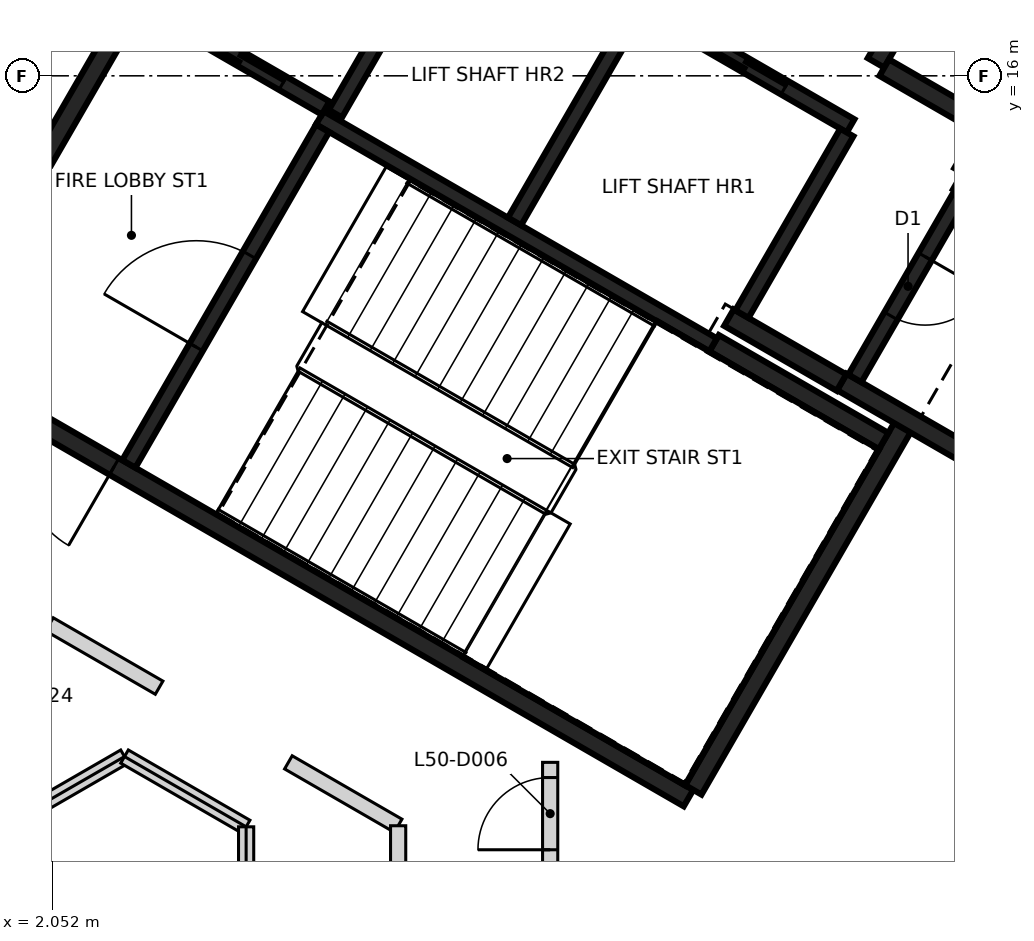
"""IFC4 building model, lengths in metres.
Left out: names, types, materials, properties, quantities, classifications, styles, units other than length and angle.
Written with IfcOpenShell. Run it as: python <this file> out.ifc"""

import sys

from ifc_helpers import new_model, si_unit, direction, frame, frame_2d, origin, place, context, subcontext, project, spatial, rectangle, extrude, element, fill, save


model = new_model("IFC4")
c1 = context("Model", 3, precision=1e-05, world=origin(), true_north=direction((0.0, 1.0)))
c2 = subcontext(c1, "Body", "Model", "MODEL_VIEW")
j1 = project(units=[si_unit("LENGTHUNIT", "METRE"), si_unit("PLANEANGLEUNIT", "RADIAN")], contexts=[c1])
p1 = place(None, origin())
s1 = spatial("IfcSite", under=j1, at=p1, CompositionType="ELEMENT")
p2 = place(p1, origin())
s2 = spatial("IfcBuilding", under=s1, at=p2, CompositionType="ELEMENT")
p3 = place(p2, frame((0.0, 0.0, 200.8)))
s3 = spatial("IfcBuildingStorey", under=s2, at=p3, CompositionType="ELEMENT", Elevation=200.8)
p4 = place(p3, frame((10.42, 6.498, 0.0), z_axis=(0.0, 0.0, 1.0), x_axis=(-0.866021906294, 0.500006057782, 0.0)))
e1 = element("IfcWall", 1, at=p4, inside=s3, PredefinedType="SHEAR", context=c2, shape_type="SweptSolid", body=[
    extrude(rectangle(XDim=11.55, YDim=0.25, at=frame_2d((5.775, 0.0))), origin(), (0.0, 0.0, 1.0), 3.25),
])
p5 = place(p4, frame((10.025, 0.0, 0.0)))
e2 = element("IfcOpeningElement", 2, at=p5, cuts=e1, PredefinedType="OPENING", context=c2, shape_type="SweptSolid", body=[
    extrude(rectangle(XDim=1.2, YDim=2.1, at=frame_2d((0.6, 1.05))), frame((0.0, 0.135, 0.0), z_axis=(0.0, -1.0, 0.0), x_axis=(1.0, 0.0, 0.0)), (0.0, 0.0, 1.0), 0.27),
])
p6 = place(p4, frame((8.725, 0.0, 0.0)))
e3 = element("IfcOpeningElement", 3, at=p6, cuts=e1, PredefinedType="OPENING", context=c2, shape_type="SweptSolid", body=[
    extrude(rectangle(XDim=1.2, YDim=2.1, at=frame_2d((0.6, 1.05))), frame((0.0, 0.135, 0.0), z_axis=(0.0, -1.0, 0.0), x_axis=(1.0, 0.0, 0.0)), (0.0, 0.0, 1.0), 0.27),
])
p7 = place(p3, frame((0.48, 12.381, 0.0), z_axis=(0.0, 0.0, 1.0), x_axis=(0.49999885962, 0.866026062182, 0.0)))
e4 = element("IfcWall", 4, at=p7, inside=s3, PredefinedType="SHEAR", context=c2, shape_type="SweptSolid", body=[
    extrude(rectangle(XDim=5.225, YDim=0.25, at=frame_2d((2.612, 0.0))), origin(), (0.0, 0.0, 1.0), 3.25),
])
p8 = place(p3, frame((13.238, 11.378, 0.0), z_axis=(0.0, 0.0, 1.0), x_axis=(-0.500008851346, -0.866020293397, 0.0)))
e5 = element("IfcWall", 5, at=p8, inside=s3, PredefinedType="SHEAR", context=c2, shape_type="SweptSolid", body=[
    extrude(rectangle(XDim=5.51, YDim=0.25, at=frame_2d((2.755, 0.0))), origin(), (0.0, 0.0, 1.0), 3.25),
])
p9 = place(p3, frame((14.918, 10.54, 0.0), z_axis=(0.0, 0.0, 1.0), x_axis=(-0.866063538972, 0.499933942099, 0.0)))
e6 = element("IfcWall", 6, at=p9, inside=s3, PredefinedType="SHEAR", context=c2, shape_type="SweptSolid", body=[
    extrude(rectangle(XDim=2.865, YDim=0.25, at=frame_2d((1.432, 0.0))), origin(), (0.0, 0.0, 1.0), 3.25),
])
p10 = place(p3, frame((13.963, 14.614, 0.0), z_axis=(0.0, 0.0, 1.0), x_axis=(0.866042235819, -0.499970844928, 0.0)))
e7 = element("IfcWall", 7, at=p10, inside=s3, PredefinedType="SHEAR", context=c2, shape_type="SweptSolid", body=[
    extrude(rectangle(XDim=2.865, YDim=0.25, at=frame_2d((1.432, 0.0))), origin(), (0.0, 0.0, 1.0), 3.25),
])
p11 = place(p3, frame((10.757, 12.481, 0.0), z_axis=(0.0, 0.0, 1.0), x_axis=(0.866022940537, -0.500004266446, 0.0)))
e8 = element("IfcWall", 8, at=p11, inside=s3, PredefinedType="SHEAR", context=c2, shape_type="SweptSolid", body=[
    extrude(rectangle(XDim=2.575, YDim=0.25, at=frame_2d((1.287, 0.0))), origin(), (0.0, 0.0, 1.0), 3.25),
])
p12 = place(p3, frame((13.819, 17.785, 0.0), z_axis=(0.0, 0.0, 1.0), x_axis=(-0.500039802285, -0.866002422705, 0.0)))
e9 = element("IfcWall", 9, at=p12, inside=s3, PredefinedType="SHEAR", context=c2, shape_type="SweptSolid", body=[
    extrude(rectangle(XDim=1.865, YDim=0.25, at=frame_2d((0.932, 0.0))), origin(), (0.0, 0.0, 1.0), 3.25),
])
p13 = place(p3, frame((12.433, 11.964, 0.0), z_axis=(0.0, 0.0, 1.0), x_axis=(-0.866038183914, 0.499977863513, 0.0)))
e10 = element("IfcWall", 10, at=p13, inside=s3, PredefinedType="SHEAR", context=c2, shape_type="SweptSolid", body=[
    extrude(rectangle(XDim=1.71, YDim=0.25, at=frame_2d((0.855, 0.0))), origin(), (0.0, 0.0, 1.0), 3.25),
])
p14 = place(p3, frame((12.995, 16.108, 0.0), z_axis=(0.0, 0.0, 1.0), x_axis=(0.866044474677, -0.49996696679, 0.0)))
e11 = element("IfcWall", 11, at=p14, inside=s3, PredefinedType="SHEAR", context=c2, shape_type="SweptSolid", body=[
    extrude(rectangle(XDim=1.584, YDim=0.25, at=frame_2d((0.792, 0.0))), origin(), (0.0, 0.0, 1.0), 3.25),
])
p15 = place(p3, frame((14.305, 15.207, 0.0), z_axis=(0.0, 0.0, 1.0), x_axis=(-0.499848422343, -0.866112899501, 0.0)))
e12 = element("IfcWall", 12, at=p15, inside=s3, PredefinedType="SHEAR", context=c2, shape_type="SweptSolid", body=[
    extrude(rectangle(XDim=0.559, YDim=0.25, at=frame_2d((0.28, 0.0))), origin(), (0.0, 0.0, 1.0), 3.25),
])
p16 = place(p3, frame((12.552, 15.342, 0.0), z_axis=(0.0, 0.0, 1.0), x_axis=(-0.866030299012, 0.499991521122, 0.0)))
e13 = element("IfcWall", 13, at=p16, inside=s3, PredefinedType="SHEAR", context=c2, shape_type="SweptSolid", body=[
    extrude(rectangle(XDim=6.1, YDim=0.2, at=frame_2d((3.05, 0.0))), origin(), (0.0, 0.0, 1.0), 3.25),
])
p17 = place(p16, frame((1.0, 0.0, 0.0)))
e14 = element("IfcOpeningElement", 14, at=p17, cuts=e13, PredefinedType="OPENING", context=c2, shape_type="SweptSolid", body=[
    extrude(rectangle(XDim=1.2, YDim=2.1, at=frame_2d((0.6, 1.05))), frame((0.0, 0.11, 0.0), z_axis=(0.0, -1.0, 0.0), x_axis=(1.0, 0.0, 0.0)), (0.0, 0.0, 1.0), 0.22),
])
p18 = place(p16, frame((3.982, 0.0, 0.0)))
e15 = element("IfcOpeningElement", 15, at=p18, cuts=e13, PredefinedType="OPENING", context=c2, shape_type="SweptSolid", body=[
    extrude(rectangle(XDim=1.2, YDim=2.1, at=frame_2d((0.6, 1.05))), frame((0.0, 0.11, 0.0), z_axis=(0.0, -1.0, 0.0), x_axis=(1.0, 0.0, 0.0)), (0.0, 0.0, 1.0), 0.22),
])
p19 = place(p3, frame((10.743, 12.46, 0.0), z_axis=(0.0, 0.0, 1.0), x_axis=(-0.866018848283, 0.500011354289, 0.0)))
e16 = element("IfcWall", 16, at=p19, inside=s3, PredefinedType="SHEAR", context=c2, shape_type="SweptSolid", body=[
    extrude(rectangle(XDim=5.974, YDim=0.2, at=frame_2d((2.987, 0.0))), origin(), (0.0, 0.0, 1.0), 3.25),
])
p20 = place(p3, frame((3.057, 10.895, 0.0), z_axis=(0.0, 0.0, 1.0), x_axis=(0.500027839223, 0.866009330205, 0.0)))
e17 = element("IfcWall", 17, at=p20, inside=s3, PredefinedType="SHEAR", context=c2, shape_type="SweptSolid", body=[
    extrude(rectangle(XDim=5.098, YDim=0.2, at=frame_2d((2.549, 0.0))), origin(), (0.0, 0.0, 1.0), 3.25),
])
p21 = place(p20, frame((1.774, 0.0, 0.0)))
e18 = element("IfcOpeningElement", 18, at=p21, cuts=e17, PredefinedType="OPENING", context=c2, shape_type="SweptSolid", body=[
    extrude(rectangle(XDim=1.4, YDim=2.1, at=frame_2d((0.7, 1.05))), frame((0.0, 0.11, 0.0), z_axis=(0.0, -1.0, 0.0), x_axis=(1.0, 0.0, 0.0)), (0.0, 0.0, 1.0), 0.22),
])
p22 = place(p3, frame((8.132, 14.084, 0.0), z_axis=(0.0, 0.0, 1.0), x_axis=(0.500030834389, 0.86600760081, 0.0)))
e19 = element("IfcWall", 19, at=p22, inside=s3, PredefinedType="SHEAR", context=c2, shape_type="SweptSolid", body=[
    extrude(rectangle(XDim=3.198, YDim=0.2, at=frame_2d((1.599, 0.0))), origin(), (0.0, 0.0, 1.0), 3.25),
])
p23 = place(p3, frame((14.008, 14.442, 0.0), z_axis=(0.0, 0.0, 1.0), x_axis=(-0.499986818241, -0.866033014143, 0.0)))
e20 = element("IfcWall", 20, at=p23, inside=s3, PredefinedType="SHEAR", context=c2, shape_type="SweptSolid", body=[
    extrude(rectangle(XDim=2.798, YDim=0.2, at=frame_2d((1.399, 0.0))), origin(), (0.0, 0.0, 1.0), 3.25),
])
p24 = place(p23, frame((0.949, 0.0, 0.0)))
e21 = element("IfcOpeningElement", 21, at=p24, cuts=e20, PredefinedType="OPENING", context=c2, shape_type="SweptSolid", body=[
    extrude(rectangle(XDim=0.9, YDim=2.1, at=frame_2d((0.45, 1.05))), frame((0.0, 0.11, 0.0), z_axis=(0.0, -1.0, 0.0), x_axis=(1.0, 0.0, 0.0)), (0.0, 0.0, 1.0), 0.22),
])
p25 = place(p3, frame((12.502, 15.255, 0.0), z_axis=(0.0, 0.0, 1.0), x_axis=(-0.499965018551, -0.866045599391, 0.0)))
e22 = element("IfcWall", 22, at=p25, inside=s3, PredefinedType="SHEAR", context=c2, shape_type="SweptSolid", body=[
    extrude(rectangle(XDim=2.759, YDim=0.2, at=frame_2d((1.379, 0.0))), origin(), (0.0, 0.0, 1.0), 3.25),
])
p26 = place(p3, frame((7.324, 18.187, 0.0), z_axis=(0.0, 0.0, 1.0), x_axis=(-0.499967891604, -0.866043940782, 0.0)))
e23 = element("IfcWall", 23, at=p26, inside=s3, PredefinedType="SHEAR", context=c2, shape_type="SweptSolid", body=[
    extrude(rectangle(XDim=3.1, YDim=0.2, at=frame_2d((1.55, 0.0))), origin(), (0.0, 0.0, 1.0), 3.25),
])
p27 = place(p3, frame((5.646, 15.576, 0.0), z_axis=(0.0, 0.0, 1.0), x_axis=(-0.866018407898, 0.500012117035, 0.0)))
e24 = element("IfcWall", 24, at=p27, inside=s3, PredefinedType="SHEAR", context=c2, shape_type="SweptSolid", body=[
    extrude(rectangle(XDim=2.651, YDim=0.2, at=frame_2d((1.325, 0.0))), origin(), (0.0, 0.0, 1.0), 3.25),
])
p28 = place(p27, frame((0.652, 0.0, 0.0)))
e25 = element("IfcOpeningElement", 25, at=p28, cuts=e24, PredefinedType="OPENING", context=c2, shape_type="SweptSolid", body=[
    extrude(rectangle(XDim=1.3, YDim=2.1, at=frame_2d((0.65, 1.05))), frame((0.0, 0.11, 0.0), z_axis=(0.0, -1.0, 0.0), x_axis=(1.0, 0.0, 0.0)), (0.0, 0.0, 1.0), 0.22),
])
p29 = place(p3, frame((-8.611, 2.648, 0.0), z_axis=(0.0, 0.0, 1.0), x_axis=(0.865953566425, 0.500124405319, 0.0)))
e26 = element("IfcWall", 26, at=p29, inside=s3, PredefinedType="PARTITIONING", context=c2, shape_type="SweptSolid", body=[
    extrude(rectangle(XDim=12.267, YDim=0.2, at=frame_2d((6.134, 0.0))), origin(), (0.0, 0.0, 1.0), 3.25),
])
p30 = place(p29, frame((9.904, 0.0, 0.0)))
e27 = element("IfcOpeningElement", 27, at=p30, cuts=e26, PredefinedType="OPENING", context=c2, shape_type="SweptSolid", body=[
    extrude(rectangle(XDim=0.9, YDim=2.1, at=frame_2d((0.45, 1.05))), frame((0.0, 0.11, 0.0), z_axis=(0.0, -1.0, 0.0), x_axis=(1.0, 0.0, 0.0)), (0.0, 0.0, 1.0), 0.22),
])
p31 = place(p29, frame((5.683, 0.0, 0.0)))
e28 = element("IfcOpeningElement", 28, at=p31, cuts=e26, PredefinedType="OPENING", context=c2, shape_type="SweptSolid", body=[
    extrude(rectangle(XDim=0.9, YDim=2.1, at=frame_2d((0.45, 1.05))), frame((0.0, 0.11, 0.0), z_axis=(0.0, -1.0, 0.0), x_axis=(1.0, 0.0, 0.0)), (0.0, 0.0, 1.0), 0.22),
])
p32 = place(p29, frame((1.463, 0.0, 0.0)))
e29 = element("IfcOpeningElement", 29, at=p32, cuts=e26, PredefinedType="OPENING", context=c2, shape_type="SweptSolid", body=[
    extrude(rectangle(XDim=0.9, YDim=2.1, at=frame_2d((0.45, 1.05))), frame((0.0, 0.11, 0.0), z_axis=(0.0, -1.0, 0.0), x_axis=(1.0, 0.0, 0.0)), (0.0, 0.0, 1.0), 0.22),
])
p33 = place(p3, frame((-1.086, 12.65, 0.0), z_axis=(0.0, 0.0, 1.0), x_axis=(0.492507119433, 0.870308415051, 0.0)))
e30 = element("IfcWall", 30, at=p33, inside=s3, PredefinedType="PARTITIONING", context=c2, shape_type="SweptSolid", body=[
    extrude(rectangle(XDim=10.531, YDim=0.2, at=frame_2d((5.266, 0.0))), origin(), (0.0, 0.0, 1.0), 3.25),
])
p34 = place(p33, frame((8.411, 0.0, 0.0)))
e31 = element("IfcOpeningElement", 31, at=p34, cuts=e30, PredefinedType="OPENING", context=c2, shape_type="SweptSolid", body=[
    extrude(rectangle(XDim=0.9, YDim=2.1, at=frame_2d((0.45, 1.05))), frame((0.0, 0.11, 0.0), z_axis=(0.0, -1.0, 0.0), x_axis=(1.0, 0.0, 0.0)), (0.0, 0.0, 1.0), 0.22),
])
p35 = place(p33, frame((3.664, 0.0, 0.0)))
e32 = element("IfcOpeningElement", 32, at=p35, cuts=e30, PredefinedType="OPENING", context=c2, shape_type="SweptSolid", body=[
    extrude(rectangle(XDim=0.95, YDim=2.1, at=frame_2d((0.475, 1.05))), frame((0.0, 0.11, 0.0), z_axis=(0.0, -1.0, 0.0), x_axis=(1.0, 0.0, 0.0)), (0.0, 0.0, 1.0), 0.22),
])
p36 = place(p3, frame((2.012, 8.784, 0.0), z_axis=(0.0, 0.0, 1.0), x_axis=(0.865934186891, -0.500157959022, 0.0)))
e33 = element("IfcWall", 33, at=p36, inside=s3, PredefinedType="PARTITIONING", context=c2, shape_type="SweptSolid", body=[
    extrude(rectangle(XDim=1.666, YDim=0.2, at=frame_2d((0.833, 0.0))), origin(), (0.0, 0.0, 1.0), 3.25),
])
p37 = place(p3, frame((5.156, 6.968, 0.0), z_axis=(0.0, 0.0, 1.0), x_axis=(0.865963705197, -0.500106849865, 0.0)))
e34 = element("IfcWall", 34, at=p37, inside=s3, PredefinedType="PARTITIONING", context=c2, shape_type="SweptSolid", body=[
    extrude(rectangle(XDim=1.668, YDim=0.2, at=frame_2d((0.834, 0.0))), origin(), (0.0, 0.0, 1.0), 3.25),
])
p38 = place(p3, frame((6.6, -6.134, 0.0), z_axis=(0.0, 0.0, 1.0), x_axis=(0.0, 1.0, 0.0)))
e35 = element("IfcWall", 35, at=p38, inside=s3, PredefinedType="PARTITIONING", context=c2, shape_type="SweptSolid", body=[
    extrude(rectangle(XDim=12.268, YDim=0.2, at=frame_2d((6.134, 0.0))), origin(), (0.0, 0.0, 1.0), 3.25),
])
p39 = place(p38, frame((1.463, 0.0, 0.0)))
e36 = element("IfcOpeningElement", 36, at=p39, cuts=e35, PredefinedType="OPENING", context=c2, shape_type="SweptSolid", body=[
    extrude(rectangle(XDim=0.9, YDim=2.1, at=frame_2d((0.45, 1.05))), frame((0.0, 0.11, 0.0), z_axis=(0.0, -1.0, 0.0), x_axis=(1.0, 0.0, 0.0)), (0.0, 0.0, 1.0), 0.22),
])
p40 = place(p38, frame((5.684, 0.0, 0.0)))
e37 = element("IfcOpeningElement", 37, at=p40, cuts=e35, PredefinedType="OPENING", context=c2, shape_type="SweptSolid", body=[
    extrude(rectangle(XDim=0.9, YDim=2.1, at=frame_2d((0.45, 1.05))), frame((0.0, 0.11, 0.0), z_axis=(0.0, -1.0, 0.0), x_axis=(1.0, 0.0, 0.0)), (0.0, 0.0, 1.0), 0.22),
])
p41 = place(p38, frame((9.905, 0.0, 0.0)))
e38 = element("IfcOpeningElement", 38, at=p41, cuts=e35, PredefinedType="OPENING", context=c2, shape_type="SweptSolid", body=[
    extrude(rectangle(XDim=0.9, YDim=2.1, at=frame_2d((0.45, 1.05))), frame((0.0, 0.11, 0.0), z_axis=(0.0, -1.0, 0.0), x_axis=(1.0, 0.0, 0.0)), (0.0, 0.0, 1.0), 0.22),
])
p42 = place(p3, frame((8.6, -4.966, 0.0), z_axis=(0.0, 0.0, 1.0), x_axis=(0.0, 1.0, 0.0)))
e39 = element("IfcWall", 39, at=p42, inside=s3, PredefinedType="PARTITIONING", context=c2, shape_type="SweptSolid", body=[
    extrude(rectangle(XDim=11.934, YDim=0.2, at=frame_2d((5.967, 0.0))), origin(), (0.0, 0.0, 1.0), 3.25),
])
p43 = place(p42, frame((0.83, 0.0, 0.0)))
e40 = element("IfcOpeningElement", 40, at=p43, cuts=e39, PredefinedType="OPENING", context=c2, shape_type="SweptSolid", body=[
    extrude(rectangle(XDim=1.0, YDim=2.1, at=frame_2d((0.5, 1.05))), frame((0.0, 0.11, 0.0), z_axis=(0.0, -1.0, 0.0), x_axis=(1.0, 0.0, 0.0)), (0.0, 0.0, 1.0), 0.22),
])
p44 = place(p42, frame((2.835, 0.0, 0.0)))
e41 = element("IfcOpeningElement", 41, at=p44, cuts=e39, PredefinedType="OPENING", context=c2, shape_type="SweptSolid", body=[
    extrude(rectangle(XDim=0.95, YDim=2.1, at=frame_2d((0.475, 1.05))), frame((0.0, 0.11, 0.0), z_axis=(0.0, -1.0, 0.0), x_axis=(1.0, 0.0, 0.0)), (0.0, 0.0, 1.0), 0.22),
])
p45 = place(p42, frame((10.784, 0.0, 0.0)))
e42 = element("IfcOpeningElement", 42, at=p45, cuts=e39, PredefinedType="OPENING", context=c2, shape_type="SweptSolid", body=[
    extrude(rectangle(XDim=0.95, YDim=2.1, at=frame_2d((0.475, 1.05))), frame((0.0, 0.11, 0.0), z_axis=(0.0, -1.0, 0.0), x_axis=(1.0, 0.0, 0.0)), (0.0, 0.0, 1.0), 0.22),
])
p46 = place(p3, frame((-7.599, 0.923, 0.0), z_axis=(0.0, 0.0, 1.0), x_axis=(0.865957029593, 0.500118408877, 0.0)))
e43 = element("IfcWall", 43, at=p46, inside=s3, PredefinedType="PARTITIONING", context=c2, shape_type="SweptSolid", body=[
    extrude(rectangle(XDim=12.24, YDim=0.2, at=frame_2d((6.12, 0.0))), origin(), (0.0, 0.0, 1.0), 3.25),
])
p47 = place(p3, frame((3.0, 7.044, 0.0), z_axis=(0.0, 0.0, 1.0), x_axis=(0.865875248522, -0.500259986404, 0.0)))
e44 = element("IfcWall", 44, at=p47, inside=s3, PredefinedType="PARTITIONING", context=c2, shape_type="SweptSolid", body=[
    extrude(rectangle(XDim=1.848, YDim=0.2, at=frame_2d((0.924, 0.0))), origin(), (0.0, 0.0, 1.0), 3.25),
])
p48 = place(p3, frame((4.6, -6.12, 0.0), z_axis=(0.0, 0.0, 1.0), x_axis=(0.0, 1.0, 0.0)))
e45 = element("IfcWall", 45, at=p48, inside=s3, PredefinedType="PARTITIONING", context=c2, shape_type="SweptSolid", body=[
    extrude(rectangle(XDim=12.24, YDim=0.2, at=frame_2d((6.12, 0.0))), origin(), (0.0, 0.0, 1.0), 3.25),
])
p49 = place(p28, origin())
e46 = element("IfcDoor", 46, at=p49, inside=s3, OperationType="SLIDING_TO_RIGHT", PredefinedType="DOOR", context=c2, shape_type="SweptSolid", body=[
    extrude(rectangle(XDim=1.3, YDim=2.1, at=frame_2d((0.65, 1.05))), frame((0.0, 0.025, 0.0), z_axis=(0.0, -1.0, 0.0), x_axis=(1.0, 0.0, 0.0)), (0.0, 0.0, 1.0), 0.05),
])
fill(e25, e46)
p50 = place(p17, origin())
e47 = element("IfcDoor", 47, at=p50, inside=s3, OperationType="DOUBLE_DOOR_SLIDING", PredefinedType="DOOR", context=c2, shape_type="SweptSolid", body=[
    extrude(rectangle(XDim=1.2, YDim=2.1, at=frame_2d((0.6, 1.05))), frame((0.0, 0.025, 0.0), z_axis=(0.0, -1.0, 0.0), x_axis=(1.0, 0.0, 0.0)), (0.0, 0.0, 1.0), 0.05),
])
fill(e14, e47)
p51 = place(p6, origin())
e48 = element("IfcDoor", 48, at=p51, inside=s3, OperationType="SINGLE_SWING_RIGHT", PredefinedType="DOOR", context=c2, shape_type="SweptSolid", body=[
    extrude(rectangle(XDim=1.2, YDim=2.1, at=frame_2d((0.6, 1.05))), frame((0.0, 0.025, 0.0), z_axis=(0.0, -1.0, 0.0), x_axis=(1.0, 0.0, 0.0)), (0.0, 0.0, 1.0), 0.05),
])
fill(e3, e48)
p52 = place(p21, origin())
e49 = element("IfcDoor", 49, at=p52, inside=s3, OperationType="SINGLE_SWING_RIGHT", PredefinedType="DOOR", context=c2, shape_type="SweptSolid", body=[
    extrude(rectangle(XDim=1.4, YDim=2.1, at=frame_2d((0.7, 1.05))), frame((0.0, 0.025, 0.0), z_axis=(0.0, -1.0, 0.0), x_axis=(1.0, 0.0, 0.0)), (0.0, 0.0, 1.0), 0.05),
])
fill(e18, e49)
p53 = place(p24, origin())
e50 = element("IfcDoor", 50, at=p53, inside=s3, OperationType="SINGLE_SWING_LEFT", PredefinedType="DOOR", context=c2, shape_type="SweptSolid", body=[
    extrude(rectangle(XDim=0.9, YDim=2.1, at=frame_2d((0.45, 1.05))), frame((0.0, 0.025, 0.0), z_axis=(0.0, -1.0, 0.0), x_axis=(1.0, 0.0, 0.0)), (0.0, 0.0, 1.0), 0.05),
])
fill(e21, e50)
p54 = place(p45, frame((0.95, 0.0, 0.0), z_axis=(0.0, 0.0, 1.0), x_axis=(-1.0, 0.0, 0.0)))
e51 = element("IfcDoor", 51, at=p54, inside=s3, OperationType="SINGLE_SWING_LEFT", PredefinedType="DOOR", context=c2, shape_type="SweptSolid", body=[
    extrude(rectangle(XDim=0.95, YDim=2.1, at=frame_2d((0.475, 1.05))), frame((0.0, 0.025, 0.0), z_axis=(0.0, -1.0, 0.0), x_axis=(1.0, 0.0, 0.0)), (0.0, 0.0, 1.0), 0.05),
])
fill(e42, e51)
save(model, sys.argv[1])
